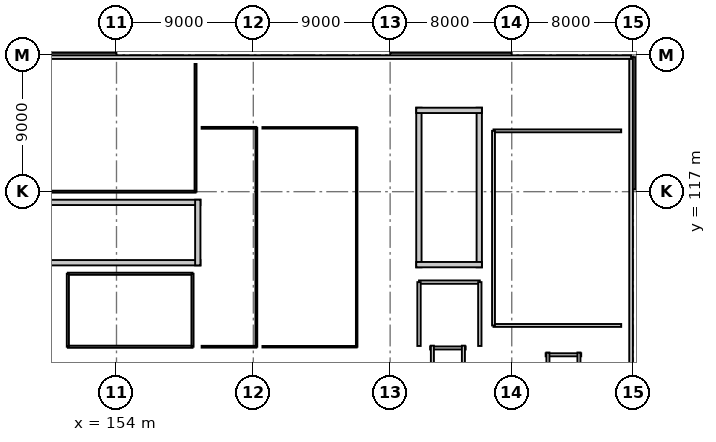
"""IFC4 building model, lengths in metres.
Left out: names, types, materials, properties, quantities, classifications, styles, units other than length and angle.
Written with IfcOpenShell. Run it as: python <this file> out.ifc"""

import sys

from ifc_helpers import new_model, si_unit, direction, frame, frame_2d, origin, origin_2d, place, context, subcontext, project, spatial, rectangle, i_section, extrude, element, fill, save


model = new_model("IFC4")
c1 = context("Model", 3, precision=1e-05, world=origin(), true_north=direction((0.0, 1.0)))
c2 = subcontext(c1, "Body", "Model", "MODEL_VIEW")
j1 = project(units=[si_unit("LENGTHUNIT", "METRE"), si_unit("PLANEANGLEUNIT", "RADIAN")], contexts=[c1])
p1 = place(None, origin())
s1 = spatial("IfcSite", under=j1, at=p1, CompositionType="ELEMENT")
p2 = place(p1, origin())
s2 = spatial("IfcBuilding", under=s1, at=p2, CompositionType="ELEMENT")
p3 = place(p2, frame((0.0, 0.0, 20.8)))
s3 = spatial("IfcBuildingStorey", under=s2, at=p3, CompositionType="ELEMENT", Elevation=20.8)
for number, where, z_axis, x_axis in (
    (1, (154.0, 117.0, 0.0), (0.0, 0.0, 1.0), (1.0, 0.0, 0.0)),
    (2, (154.0, 126.0, 0.0), (0.0, 0.0, 1.0), (1.0, 0.0, 0.0)),
    (3, (163.0, 117.0, 0.0), (0.0, 0.0, 1.0), (1.0, 0.0, 0.0)),
    (4, (163.0, 126.0, 0.0), (0.0, 0.0, 1.0), (1.0, 0.0, 0.0)),
    (5, (172.0, 117.0, 0.0), (0.0, 0.0, 1.0), (1.0, 0.0, 0.0)),
    (6, (172.0, 126.0, 0.0), (0.0, 0.0, 1.0), (1.0, 0.0, 0.0)),
    (7, (180.0, 117.0, 0.0), (0.0, 0.0, 1.0), (1.0, 0.0, 0.0)),
    (8, (180.0, 126.0, 0.0), (0.0, 0.0, 1.0), (1.0, 0.0, 0.0)),
    (9, (188.0, 117.0, 0.0), (0.0, 0.0, 1.0), (1.0, 0.0, 0.0)),
    (10, (188.0, 126.0, 0.0), (0.0, 0.0, 1.0), (1.0, 0.0, 0.0)),
):
    element("IfcColumn", number, at=place(p3, frame(where, z_axis=z_axis, x_axis=x_axis)), inside=s3, PredefinedType="COLUMN", context=c2, shape_type="SweptSolid", body=[
        extrude(i_section(OverallWidth=0.3, OverallDepth=0.3, WebThickness=0.01, FlangeThickness=0.015, FilletRadius=0.018, at=origin_2d()), origin(), (0.0, 0.0, 1.0), 2.85),
    ])
p4 = place(p3, frame((145.005, 126.0, 0.0), z_axis=(0.0, 0.0, 1.0), x_axis=(1.0, 0.0, 0.0)))
e11 = element("IfcWall", 11, at=p4, inside=s3, PredefinedType="SOLIDWALL", context=c2, shape_type="SweptSolid", body=[
    extrude(rectangle(XDim=8.99, YDim=0.26, at=frame_2d((4.495, 0.0))), origin(), (0.0, 0.0, 1.0), 2.23),
])
p5 = place(p4, frame((1.86, 0.0, 0.7)))
e12 = element("IfcOpeningElement", 12, at=p5, cuts=e11, PredefinedType="OPENING", context=c2, shape_type="SweptSolid", body=[
    extrude(rectangle(XDim=1.15, YDim=1.45, at=frame_2d((0.575, 0.725))), frame((0.0, 0.14, 0.0), z_axis=(0.0, -1.0, 0.0), x_axis=(1.0, 0.0, 0.0)), (0.0, 0.0, 1.0), 0.28),
])
p6 = place(p4, frame((5.98, 0.0, 0.7)))
e13 = element("IfcOpeningElement", 13, at=p6, cuts=e11, PredefinedType="OPENING", context=c2, shape_type="SweptSolid", body=[
    extrude(rectangle(XDim=1.15, YDim=1.45, at=frame_2d((0.575, 0.725))), frame((0.0, 0.14, 0.0), z_axis=(0.0, -1.0, 0.0), x_axis=(1.0, 0.0, 0.0)), (0.0, 0.0, 1.0), 0.28),
])
p7 = place(p3, frame((172.005, 126.0, 0.0), z_axis=(0.0, 0.0, 1.0), x_axis=(1.0, 0.0, 0.0)))
e14 = element("IfcWall", 14, at=p7, inside=s3, PredefinedType="SOLIDWALL", context=c2, shape_type="SweptSolid", body=[
    extrude(rectangle(XDim=7.99, YDim=0.26, at=frame_2d((3.995, 0.0))), origin(), (0.0, 0.0, 1.0), 2.23),
])
p8 = place(p7, frame((3.42, 0.0, 0.7)))
e15 = element("IfcOpeningElement", 15, at=p8, cuts=e14, PredefinedType="OPENING", context=c2, shape_type="SweptSolid", body=[
    extrude(rectangle(XDim=1.15, YDim=1.45, at=frame_2d((0.575, 0.725))), frame((0.0, 0.14, 0.0), z_axis=(0.0, -1.0, 0.0), x_axis=(1.0, 0.0, 0.0)), (0.0, 0.0, 1.0), 0.28),
])
p9 = place(p3, frame((188.0, 125.85, 0.0), z_axis=(0.0, 0.0, 1.0), x_axis=(0.0, -1.0, 0.0)))
e16 = element("IfcWall", 16, at=p9, inside=s3, PredefinedType="SOLIDWALL", context=c2, shape_type="SweptSolid", body=[
    extrude(rectangle(XDim=8.7, YDim=0.245, at=frame_2d((4.35, 0.0))), origin(), (0.0, 0.0, 1.0), 2.18),
])
p10 = place(p3, frame((187.85, 76.65, 2.85), z_axis=(0.0, 0.0, 1.0), x_axis=(0.0, 1.0, 0.0)))
e17 = element("IfcWall", 17, at=p10, inside=s3, PredefinedType="PARAPET", context=c2, shape_type="SweptSolid", body=[
    extrude(rectangle(XDim=49.2, YDim=0.24, at=frame_2d((24.6, 0.0))), origin(), (0.0, 0.0, 1.0), 0.34),
])
p11 = place(p3, frame((187.85, 125.85, 2.85), z_axis=(0.0, 0.0, 1.0), x_axis=(-1.0, 0.0, 0.0)))
e18 = element("IfcWall", 18, at=p11, inside=s3, PredefinedType="PARAPET", context=c2, shape_type="SweptSolid", body=[
    extrude(rectangle(XDim=51.7, YDim=0.24, at=frame_2d((25.85, 0.0))), origin(), (0.0, 0.0, 1.0), 0.34),
])
for number, where, z_axis, x_axis in (
    (19, (177.863, 112.025, 0.0), (0.0, 0.0, 1.0), (0.0, 1.0, 0.0)),
    (20, (173.893, 122.522, 0.0), (0.0, 0.0, 1.0), (0.0, -1.0, 0.0)),
):
    element("IfcWall", number, at=place(p3, frame(where, z_axis=z_axis, x_axis=x_axis)), inside=s3, PredefinedType="SHEAR", context=c2, shape_type="SweptSolid", body=[
        extrude(rectangle(XDim=10.498, YDim=0.35, at=frame_2d((5.249, 0.0))), origin(), (0.0, 0.0, 1.0), 2.645),
    ])
p12 = place(p3, frame((178.038, 122.347, 0.0), z_axis=(0.0, 0.0, 1.0), x_axis=(-1.0, 0.0, 0.0)))
e21 = element("IfcWall", 21, at=p12, inside=s3, PredefinedType="SHEAR", context=c2, shape_type="SweptSolid", body=[
    extrude(rectangle(XDim=4.32, YDim=0.35, at=frame_2d((2.16, 0.0))), origin(), (0.0, 0.0, 1.0), 2.645),
])
p13 = place(p3, frame((173.718, 112.2, 0.0), z_axis=(0.0, 0.0, 1.0), x_axis=(1.0, 0.0, 0.0)))
e22 = element("IfcWall", 22, at=p13, inside=s3, PredefinedType="SHEAR", context=c2, shape_type="SweptSolid", body=[
    extrude(rectangle(XDim=4.32, YDim=0.35, at=frame_2d((2.16, 0.0))), origin(), (0.0, 0.0, 1.0), 2.645),
])
p14 = place(p13, frame((1.15, 0.0, 0.0)))
e23 = element("IfcOpeningElement", 23, at=p14, cuts=e22, PredefinedType="OPENING", context=c2, shape_type="SweptSolid", body=[
    extrude(rectangle(XDim=1.3, YDim=2.1, at=frame_2d((0.65, 1.05))), frame((0.0, 0.185, 0.0), z_axis=(0.0, -1.0, 0.0), x_axis=(1.0, 0.0, 0.0)), (0.0, 0.0, 1.0), 0.37),
])
p15 = place(p3, frame((149.025, 112.325, 0.0), z_axis=(0.0, 0.0, 1.0), x_axis=(1.0, 0.0, 0.0)))
e24 = element("IfcWall", 24, at=p15, inside=s3, PredefinedType="SHEAR", context=c2, shape_type="SweptSolid", body=[
    extrude(rectangle(XDim=10.498, YDim=0.35, at=frame_2d((5.249, 0.0))), origin(), (0.0, 0.0, 1.0), 2.645),
])
p16 = place(p15, frame((0.55, 0.0, 0.0)))
e25 = element("IfcOpeningElement", 25, at=p16, cuts=e24, PredefinedType="OPENING", context=c2, shape_type="SweptSolid", body=[
    extrude(rectangle(XDim=1.3, YDim=2.1, at=frame_2d((0.65, 1.05))), frame((0.0, 0.185, 0.0), z_axis=(0.0, -1.0, 0.0), x_axis=(1.0, 0.0, 0.0)), (0.0, 0.0, 1.0), 0.37),
])
p17 = place(p3, frame((159.522, 116.295, 0.0), z_axis=(0.0, 0.0, 1.0), x_axis=(-1.0, 0.0, 0.0)))
e26 = element("IfcWall", 26, at=p17, inside=s3, PredefinedType="SHEAR", context=c2, shape_type="SweptSolid", body=[
    extrude(rectangle(XDim=10.498, YDim=0.35, at=frame_2d((5.249, 0.0))), origin(), (0.0, 0.0, 1.0), 2.645),
])
p18 = place(p3, frame((159.347, 112.15, 0.0), z_axis=(0.0, 0.0, 1.0), x_axis=(0.0, 1.0, 0.0)))
e27 = element("IfcWall", 27, at=p18, inside=s3, PredefinedType="SHEAR", context=c2, shape_type="SweptSolid", body=[
    extrude(rectangle(XDim=4.32, YDim=0.35, at=frame_2d((2.16, 0.0))), origin(), (0.0, 0.0, 1.0), 2.645),
])
p19 = place(p3, frame((176.97, 106.72, 0.0), z_axis=(0.0, 0.0, 1.0), x_axis=(-1.0, 0.0, 0.0)))
e28 = element("IfcWall", 28, at=p19, inside=s3, PredefinedType="SOLIDWALL", context=c2, shape_type="SweptSolid", body=[
    extrude(rectangle(XDim=2.34, YDim=0.2, at=frame_2d((1.17, 0.0))), origin(), (0.0, 0.0, 1.0), 2.62),
])
p20 = place(p19, frame((0.57, 0.0, 0.0)))
e29 = element("IfcOpeningElement", 29, at=p20, cuts=e28, PredefinedType="OPENING", context=c2, shape_type="SweptSolid", body=[
    extrude(rectangle(XDim=1.2, YDim=2.15, at=frame_2d((0.6, 1.075))), frame((0.0, 0.11, 0.0), z_axis=(0.0, -1.0, 0.0), x_axis=(1.0, 0.0, 0.0)), (0.0, 0.0, 1.0), 0.22),
])
for number, where, z_axis, x_axis in (
    (30, (174.78, 106.87, 0.0), (0.0, 0.0, 1.0), (0.0, -1.0, 0.0)),
    (31, (176.82, 103.73, 0.0), (0.0, 0.0, 1.0), (0.0, 1.0, 0.0)),
):
    element("IfcWall", number, at=place(p3, frame(where, z_axis=z_axis, x_axis=x_axis)), inside=s3, PredefinedType="SOLIDWALL", context=c2, shape_type="SweptSolid", body=[
        extrude(rectangle(XDim=3.14, YDim=0.2, at=frame_2d((1.57, 0.0))), origin(), (0.0, 0.0, 1.0), 2.23),
    ])
p21 = place(p3, frame((184.57, 106.27, 0.0), z_axis=(0.0, 0.0, 1.0), x_axis=(-1.0, 0.0, 0.0)))
e32 = element("IfcWall", 32, at=p21, inside=s3, PredefinedType="SOLIDWALL", context=c2, shape_type="SweptSolid", body=[
    extrude(rectangle(XDim=2.34, YDim=0.2, at=frame_2d((1.17, 0.0))), origin(), (0.0, 0.0, 1.0), 2.62),
])
for number, where, z_axis, x_axis in (
    (33, (182.38, 106.42, 0.0), (0.0, 0.0, 1.0), (0.0, -1.0, 0.0)),
    (34, (184.42, 103.58, 0.0), (0.0, 0.0, 1.0), (0.0, 1.0, 0.0)),
):
    element("IfcWall", number, at=place(p3, frame(where, z_axis=z_axis, x_axis=x_axis)), inside=s3, PredefinedType="SOLIDWALL", context=c2, shape_type="SweptSolid", body=[
        extrude(rectangle(XDim=2.84, YDim=0.2, at=frame_2d((1.42, 0.0))), origin(), (0.0, 0.0, 1.0), 2.23),
    ])
p22 = place(p3, frame((159.0, 106.8, 0.0), z_axis=(0.0, 0.0, 1.0), x_axis=(-1.0, 0.0, 0.0)))
e35 = element("IfcWall", 35, at=p22, inside=s3, PredefinedType="PARTITIONING", context=c2, shape_type="SweptSolid", body=[
    extrude(rectangle(XDim=8.2, YDim=0.14, at=frame_2d((4.1, 0.0))), origin(), (0.0, 0.0, 1.0), 2.18),
])
p23 = place(p22, frame((3.475, 0.0, 0.0)))
e36 = element("IfcOpeningElement", 36, at=p23, cuts=e35, PredefinedType="OPENING", context=c2, shape_type="SweptSolid", body=[
    extrude(rectangle(XDim=1.25, YDim=2.1, at=frame_2d((0.625, 1.05))), frame((0.0, 0.08, 0.0), z_axis=(0.0, -1.0, 0.0), x_axis=(1.0, 0.0, 0.0)), (0.0, 0.0, 1.0), 0.16),
])
p24 = place(p3, frame((150.8, 111.6, 0.0), z_axis=(0.0, 0.0, 1.0), x_axis=(1.0, 0.0, 0.0)))
e37 = element("IfcWall", 37, at=p24, inside=s3, PredefinedType="PARTITIONING", context=c2, shape_type="SweptSolid", body=[
    extrude(rectangle(XDim=8.2, YDim=0.14, at=frame_2d((4.1, 0.0))), origin(), (0.0, 0.0, 1.0), 2.18),
])
p25 = place(p3, frame((150.8, 106.8, 0.0), z_axis=(0.0, 0.0, 1.0), x_axis=(0.0, 1.0, 0.0)))
e38 = element("IfcWall", 38, at=p25, inside=s3, PredefinedType="PARTITIONING", context=c2, shape_type="SweptSolid", body=[
    extrude(rectangle(XDim=4.8, YDim=0.14, at=frame_2d((2.4, 0.0))), origin(), (0.0, 0.0, 1.0), 2.62),
])
p26 = place(p3, frame((159.0, 111.6, 0.0), z_axis=(0.0, 0.0, 1.0), x_axis=(0.0, -1.0, 0.0)))
e39 = element("IfcWall", 39, at=p26, inside=s3, PredefinedType="PARTITIONING", context=c2, shape_type="SweptSolid", body=[
    extrude(rectangle(XDim=4.8, YDim=0.14, at=frame_2d((2.4, 0.0))), origin(), (0.0, 0.0, 1.0), 2.22),
])
p27 = place(p3, frame((159.2, 117.0, 0.0), z_axis=(0.0, 0.0, 1.0), x_axis=(-1.0, 0.0, 0.0)))
e40 = element("IfcWall", 40, at=p27, inside=s3, PredefinedType="PARTITIONING", context=c2, shape_type="SweptSolid", body=[
    extrude(rectangle(XDim=12.4, YDim=0.13, at=frame_2d((6.2, 0.0))), origin(), (0.0, 0.0, 1.0), 2.18),
])
p28 = place(p3, frame((159.2, 125.4, 0.0), z_axis=(0.0, 0.0, 1.0), x_axis=(0.0, -1.0, 0.0)))
e41 = element("IfcWall", 41, at=p28, inside=s3, PredefinedType="PARTITIONING", context=c2, shape_type="SweptSolid", body=[
    extrude(rectangle(XDim=8.4, YDim=0.13, at=frame_2d((4.2, 0.0))), origin(), (0.0, 0.0, 1.0), 2.22),
])
p29 = place(p28, frame((3.575, 0.0, 0.0)))
e42 = element("IfcOpeningElement", 42, at=p29, cuts=e41, PredefinedType="OPENING", context=c2, shape_type="SweptSolid", body=[
    extrude(rectangle(XDim=1.25, YDim=2.1, at=frame_2d((0.625, 1.05))), frame((0.0, 0.075, 0.0), z_axis=(0.0, -1.0, 0.0), x_axis=(1.0, 0.0, 0.0)), (0.0, 0.0, 1.0), 0.15),
])
p30 = place(p3, frame((163.2, 106.8, 0.0), z_axis=(0.0, 0.0, 1.0), x_axis=(-1.0, 0.0, 0.0)))
e43 = element("IfcWall", 43, at=p30, inside=s3, PredefinedType="PARTITIONING", context=c2, shape_type="SweptSolid", body=[
    extrude(rectangle(XDim=3.6, YDim=0.12, at=frame_2d((1.8, 0.0))), origin(), (0.0, 0.0, 1.0), 2.18),
])
p31 = place(p30, frame((1.275, 0.0, 0.0)))
e44 = element("IfcOpeningElement", 44, at=p31, cuts=e43, PredefinedType="OPENING", context=c2, shape_type="SweptSolid", body=[
    extrude(rectangle(XDim=1.05, YDim=2.1, at=frame_2d((0.525, 1.05))), frame((0.0, 0.07, 0.0), z_axis=(0.0, -1.0, 0.0), x_axis=(1.0, 0.0, 0.0)), (0.0, 0.0, 1.0), 0.14),
])
p32 = place(p3, frame((159.6, 121.2, 0.0), z_axis=(0.0, 0.0, 1.0), x_axis=(1.0, 0.0, 0.0)))
e45 = element("IfcWall", 45, at=p32, inside=s3, PredefinedType="PARTITIONING", context=c2, shape_type="SweptSolid", body=[
    extrude(rectangle(XDim=3.6, YDim=0.12, at=frame_2d((1.8, 0.0))), origin(), (0.0, 0.0, 1.0), 2.23),
])
p33 = place(p3, frame((163.2, 121.2, 0.0), z_axis=(0.0, 0.0, 1.0), x_axis=(0.0, -1.0, 0.0)))
e46 = element("IfcWall", 46, at=p33, inside=s3, PredefinedType="PARTITIONING", context=c2, shape_type="SweptSolid", body=[
    extrude(rectangle(XDim=14.4, YDim=0.12, at=frame_2d((7.2, 0.0))), origin(), (0.0, 0.0, 1.0), 2.18),
])
p34 = place(p3, frame((169.8, 106.8, 0.0), z_axis=(0.0, 0.0, 1.0), x_axis=(-1.0, 0.0, 0.0)))
e47 = element("IfcWall", 47, at=p34, inside=s3, PredefinedType="PARTITIONING", context=c2, shape_type="SweptSolid", body=[
    extrude(rectangle(XDim=6.2, YDim=0.1, at=frame_2d((3.1, 0.0))), origin(), (0.0, 0.0, 1.0), 2.18),
])
p35 = place(p3, frame((163.6, 121.2, 0.0), z_axis=(0.0, 0.0, 1.0), x_axis=(1.0, 0.0, 0.0)))
e48 = element("IfcWall", 48, at=p35, inside=s3, PredefinedType="PARTITIONING", context=c2, shape_type="SweptSolid", body=[
    extrude(rectangle(XDim=6.2, YDim=0.1, at=frame_2d((3.1, 0.0))), origin(), (0.0, 0.0, 1.0), 2.23),
])
p36 = place(p3, frame((169.8, 121.2, 0.0), z_axis=(0.0, 0.0, 1.0), x_axis=(0.0, -1.0, 0.0)))
e49 = element("IfcWall", 49, at=p36, inside=s3, PredefinedType="PARTITIONING", context=c2, shape_type="SweptSolid", body=[
    extrude(rectangle(XDim=14.4, YDim=0.1, at=frame_2d((7.2, 0.0))), origin(), (0.0, 0.0, 1.0), 2.23),
])
p37 = place(p36, frame((6.575, 0.0, 0.0)))
e50 = element("IfcOpeningElement", 50, at=p37, cuts=e49, PredefinedType="OPENING", context=c2, shape_type="SweptSolid", body=[
    extrude(rectangle(XDim=1.25, YDim=2.1, at=frame_2d((0.625, 1.05))), frame((0.0, 0.06, 0.0), z_axis=(0.0, -1.0, 0.0), x_axis=(1.0, 0.0, 0.0)), (0.0, 0.0, 1.0), 0.12),
])
p38 = place(p36, frame((10.944, 0.0, 0.0)))
e51 = element("IfcOpeningElement", 51, at=p38, cuts=e49, PredefinedType="OPENING", context=c2, shape_type="SweptSolid", body=[
    extrude(rectangle(XDim=1.25, YDim=2.1, at=frame_2d((0.625, 1.05))), frame((0.0, 0.06, 0.0), z_axis=(0.0, -1.0, 0.0), x_axis=(1.0, 0.0, 0.0)), (0.0, 0.0, 1.0), 0.12),
])
p39 = place(p3, frame((187.2, 108.2, 0.0), z_axis=(0.0, 0.0, 1.0), x_axis=(-1.0, 0.0, 0.0)))
e52 = element("IfcWall", 52, at=p39, inside=s3, PredefinedType="PARTITIONING", context=c2, shape_type="SweptSolid", body=[
    extrude(rectangle(XDim=8.4, YDim=0.19, at=frame_2d((4.2, 0.0))), origin(), (0.0, 0.0, 1.0), 2.18),
])
p40 = place(p3, frame((178.8, 121.0, 0.0), z_axis=(0.0, 0.0, 1.0), x_axis=(1.0, 0.0, 0.0)))
e53 = element("IfcWall", 53, at=p40, inside=s3, PredefinedType="PARTITIONING", context=c2, shape_type="SweptSolid", body=[
    extrude(rectangle(XDim=8.4, YDim=0.19, at=frame_2d((4.2, 0.0))), origin(), (0.0, 0.0, 1.0), 2.23),
])
p41 = place(p40, frame((3.65, 0.0, 0.0)))
e54 = element("IfcOpeningElement", 54, at=p41, cuts=e53, PredefinedType="OPENING", context=c2, shape_type="SweptSolid", body=[
    extrude(rectangle(XDim=1.1, YDim=2.1, at=frame_2d((0.55, 1.05))), frame((0.0, 0.105, 0.0), z_axis=(0.0, -1.0, 0.0), x_axis=(1.0, 0.0, 0.0)), (0.0, 0.0, 1.0), 0.21),
])
p42 = place(p3, frame((178.8, 108.2, 0.0), z_axis=(0.0, 0.0, 1.0), x_axis=(0.0, 1.0, 0.0)))
e55 = element("IfcWall", 55, at=p42, inside=s3, PredefinedType="PARTITIONING", context=c2, shape_type="SweptSolid", body=[
    extrude(rectangle(XDim=12.8, YDim=0.19, at=frame_2d((6.4, 0.0))), origin(), (0.0, 0.0, 1.0), 2.23),
])
p43 = place(p3, frame((173.9, 111.05, 0.0), z_axis=(0.0, 0.0, 1.0), x_axis=(1.0, 0.0, 0.0)))
e56 = element("IfcWall", 56, at=p43, inside=s3, PredefinedType="SOLIDWALL", context=c2, shape_type="SweptSolid", body=[
    extrude(rectangle(XDim=4.0, YDim=0.22, at=frame_2d((2.0, 0.0))), origin(), (0.0, 0.0, 1.0), 2.62),
])
p44 = place(p3, frame((173.9, 106.85, 0.0), z_axis=(0.0, 0.0, 1.0), x_axis=(0.0, 1.0, 0.0)))
e57 = element("IfcWall", 57, at=p44, inside=s3, PredefinedType="SOLIDWALL", context=c2, shape_type="SweptSolid", body=[
    extrude(rectangle(XDim=4.2, YDim=0.22, at=frame_2d((2.1, 0.0))), origin(), (0.0, 0.0, 1.0), 2.62),
])
p45 = place(p44, frame((1.4, 0.0, 0.0)))
e58 = element("IfcOpeningElement", 58, at=p45, cuts=e57, PredefinedType="OPENING", context=c2, shape_type="SweptSolid", body=[
    extrude(rectangle(XDim=1.4, YDim=2.1, at=frame_2d((0.7, 1.05))), frame((0.0, 0.12, 0.0), z_axis=(0.0, -1.0, 0.0), x_axis=(1.0, 0.0, 0.0)), (0.0, 0.0, 1.0), 0.24),
])
p46 = place(p3, frame((177.9, 111.05, 0.0), z_axis=(0.0, 0.0, 1.0), x_axis=(0.0, -1.0, 0.0)))
e59 = element("IfcWall", 59, at=p46, inside=s3, PredefinedType="SOLIDWALL", context=c2, shape_type="SweptSolid", body=[
    extrude(rectangle(XDim=4.2, YDim=0.22, at=frame_2d((2.1, 0.0))), origin(), (0.0, 0.0, 1.0), 2.62),
])
p47 = place(p6, origin())
e60 = element("IfcWindow", 60, at=p47, inside=s3, PartitioningType="SINGLE_PANEL", PredefinedType="WINDOW", context=c2, shape_type="SweptSolid", body=[
    extrude(rectangle(XDim=1.15, YDim=1.45, at=frame_2d((0.575, 0.725))), frame((0.0, 0.03, 0.0), z_axis=(0.0, -1.0, 0.0), x_axis=(1.0, 0.0, 0.0)), (0.0, 0.0, 1.0), 0.06),
])
fill(e13, e60)
p48 = place(p8, origin())
e61 = element("IfcWindow", 61, at=p48, inside=s3, PartitioningType="SINGLE_PANEL", PredefinedType="WINDOW", context=c2, shape_type="SweptSolid", body=[
    extrude(rectangle(XDim=1.15, YDim=1.45, at=frame_2d((0.575, 0.725))), frame((0.0, 0.03, 0.0), z_axis=(0.0, -1.0, 0.0), x_axis=(1.0, 0.0, 0.0)), (0.0, 0.0, 1.0), 0.06),
])
fill(e15, e61)
p49 = place(p14, origin())
e62 = element("IfcDoor", 62, at=p49, inside=s3, OperationType="SINGLE_SWING_RIGHT", PredefinedType="DOOR", context=c2, shape_type="SweptSolid", body=[
    extrude(rectangle(XDim=1.3, YDim=2.1, at=frame_2d((0.65, 1.05))), frame((0.0, 0.025, 0.0), z_axis=(0.0, -1.0, 0.0), x_axis=(1.0, 0.0, 0.0)), (0.0, 0.0, 1.0), 0.05),
])
fill(e23, e62)
p50 = place(p16, origin())
e63 = element("IfcDoor", 63, at=p50, inside=s3, OperationType="SINGLE_SWING_LEFT", PredefinedType="DOOR", context=c2, shape_type="SweptSolid", body=[
    extrude(rectangle(XDim=1.3, YDim=2.1, at=frame_2d((0.65, 1.05))), frame((0.0, 0.025, 0.0), z_axis=(0.0, -1.0, 0.0), x_axis=(1.0, 0.0, 0.0)), (0.0, 0.0, 1.0), 0.05),
])
fill(e25, e63)
p51 = place(p20, origin())
e64 = element("IfcDoor", 64, at=p51, inside=s3, OperationType="SLIDING_TO_LEFT", PredefinedType="DOOR", context=c2, shape_type="SweptSolid", body=[
    extrude(rectangle(XDim=1.2, YDim=2.15, at=frame_2d((0.6, 1.075))), frame((0.0, 0.025, 0.0), z_axis=(0.0, -1.0, 0.0), x_axis=(1.0, 0.0, 0.0)), (0.0, 0.0, 1.0), 0.05),
])
fill(e29, e64)
p52 = place(p23, origin())
e65 = element("IfcDoor", 65, at=p52, inside=s3, OperationType="SINGLE_SWING_LEFT", PredefinedType="DOOR", context=c2, shape_type="SweptSolid", body=[
    extrude(rectangle(XDim=1.25, YDim=2.1, at=frame_2d((0.625, 1.05))), frame((0.0, 0.025, 0.0), z_axis=(0.0, -1.0, 0.0), x_axis=(1.0, 0.0, 0.0)), (0.0, 0.0, 1.0), 0.05),
])
fill(e36, e65)
p53 = place(p29, origin())
e66 = element("IfcDoor", 66, at=p53, inside=s3, OperationType="SINGLE_SWING_RIGHT", PredefinedType="DOOR", context=c2, shape_type="SweptSolid", body=[
    extrude(rectangle(XDim=1.25, YDim=2.1, at=frame_2d((0.625, 1.05))), frame((0.0, 0.025, 0.0), z_axis=(0.0, -1.0, 0.0), x_axis=(1.0, 0.0, 0.0)), (0.0, 0.0, 1.0), 0.05),
])
fill(e42, e66)
p54 = place(p31, origin())
e67 = element("IfcDoor", 67, at=p54, inside=s3, OperationType="SINGLE_SWING_LEFT", PredefinedType="DOOR", context=c2, shape_type="SweptSolid", body=[
    extrude(rectangle(XDim=1.05, YDim=2.1, at=frame_2d((0.525, 1.05))), frame((0.0, 0.025, 0.0), z_axis=(0.0, -1.0, 0.0), x_axis=(1.0, 0.0, 0.0)), (0.0, 0.0, 1.0), 0.05),
])
fill(e44, e67)
p55 = place(p37, origin())
e68 = element("IfcDoor", 68, at=p55, inside=s3, OperationType="SINGLE_SWING_RIGHT", PredefinedType="DOOR", context=c2, shape_type="SweptSolid", body=[
    extrude(rectangle(XDim=1.25, YDim=2.1, at=frame_2d((0.625, 1.05))), frame((0.0, 0.025, 0.0), z_axis=(0.0, -1.0, 0.0), x_axis=(1.0, 0.0, 0.0)), (0.0, 0.0, 1.0), 0.05),
])
fill(e50, e68)
p56 = place(p38, origin())
e69 = element("IfcDoor", 69, at=p56, inside=s3, OperationType="SINGLE_SWING_LEFT", PredefinedType="DOOR", context=c2, shape_type="SweptSolid", body=[
    extrude(rectangle(XDim=1.25, YDim=2.1, at=frame_2d((0.625, 1.05))), frame((0.0, 0.025, 0.0), z_axis=(0.0, -1.0, 0.0), x_axis=(1.0, 0.0, 0.0)), (0.0, 0.0, 1.0), 0.05),
])
fill(e51, e69)
p57 = place(p41, origin())
e70 = element("IfcDoor", 70, at=p57, inside=s3, OperationType="SINGLE_SWING_RIGHT", PredefinedType="DOOR", context=c2, shape_type="SweptSolid", body=[
    extrude(rectangle(XDim=1.1, YDim=2.1, at=frame_2d((0.55, 1.05))), frame((0.0, 0.025, 0.0), z_axis=(0.0, -1.0, 0.0), x_axis=(1.0, 0.0, 0.0)), (0.0, 0.0, 1.0), 0.05),
])
fill(e54, e70)
p58 = place(p45, origin())
e71 = element("IfcDoor", 71, at=p58, inside=s3, OperationType="SINGLE_SWING_LEFT", PredefinedType="DOOR", context=c2, shape_type="SweptSolid", body=[
    extrude(rectangle(XDim=1.4, YDim=2.1, at=frame_2d((0.7, 1.05))), frame((0.0, 0.025, 0.0), z_axis=(0.0, -1.0, 0.0), x_axis=(1.0, 0.0, 0.0)), (0.0, 0.0, 1.0), 0.05),
])
fill(e58, e71)
save(model, sys.argv[1])
